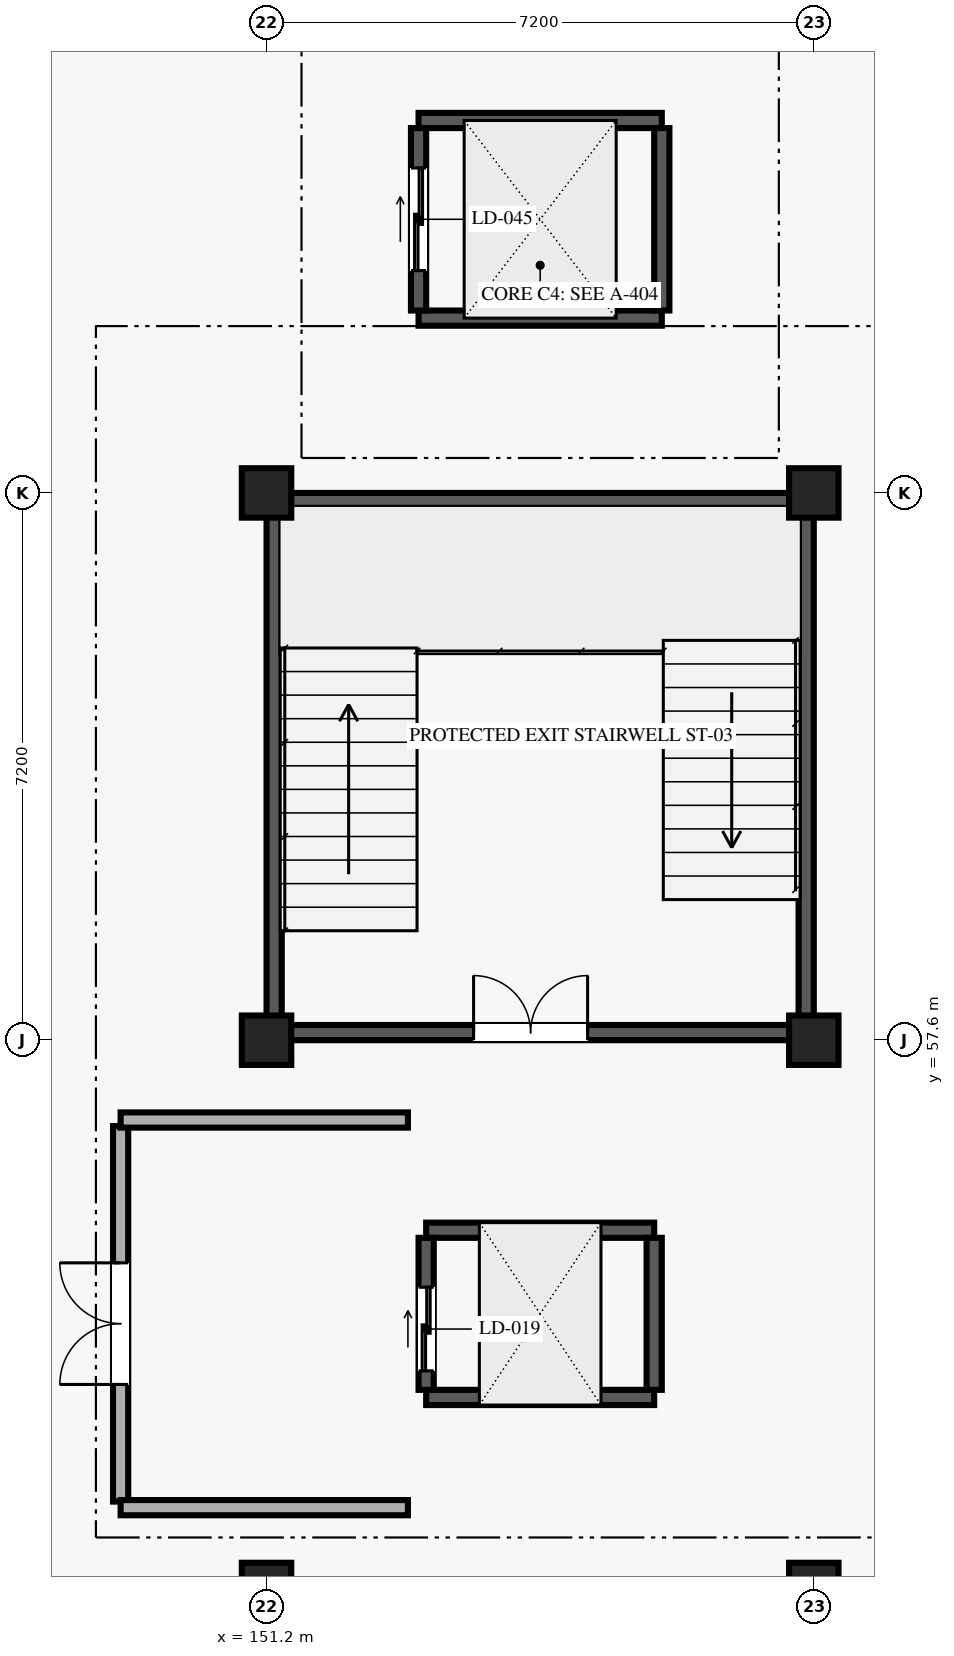
"""IFC4 building model, lengths in metres.
Left out: names, types, materials, properties, quantities, classifications, styles, units other than length and angle.
Written with IfcOpenShell. Run it as: python <this file> out.ifc"""

import sys

from ifc_helpers import new_model, si_unit, direction, frame, frame_2d, origin, origin_2d, place, context, subcontext, project, spatial, rectangle, extrude, element, fill, save


model = new_model("IFC4")
c1 = context("Model", 3, precision=1e-05, world=origin(), true_north=direction((0.0, 1.0)))
c2 = subcontext(c1, "Body", "Model", "MODEL_VIEW")
j1 = project(units=[si_unit("LENGTHUNIT", "METRE"), si_unit("PLANEANGLEUNIT", "RADIAN")], contexts=[c1])
p1 = place(None, origin())
s1 = spatial("IfcSite", under=j1, at=p1, CompositionType="ELEMENT")
p2 = place(p1, origin())
s2 = spatial("IfcBuilding", under=s1, at=p2, CompositionType="ELEMENT")
p3 = place(p2, frame((0.0, 0.0, -4.5)))
s3 = spatial("IfcBuildingStorey", under=s2, at=p3, CompositionType="ELEMENT", Elevation=-4.5)
for number, where, z_axis, x_axis in (
    (1, (151.2, 50.4, 0.0), (0.0, 0.0, 1.0), (1.0, 0.0, 0.0)),
    (2, (151.2, 57.6, 0.0), (0.0, 0.0, 1.0), (1.0, 0.0, 0.0)),
    (3, (151.2, 64.8, 0.0), (0.0, 0.0, 1.0), (1.0, 0.0, 0.0)),
    (4, (158.4, 50.4, 0.0), (0.0, 0.0, 1.0), (1.0, 0.0, 0.0)),
    (5, (158.4, 57.6, 0.0), (0.0, 0.0, 1.0), (1.0, 0.0, 0.0)),
    (6, (158.4, 64.8, 0.0), (0.0, 0.0, 1.0), (1.0, 0.0, 0.0)),
):
    element("IfcColumn", number, at=place(p3, frame(where, z_axis=z_axis, x_axis=x_axis)), inside=s3, PredefinedType="COLUMN", context=c2, shape_type="SweptSolid", body=[
        extrude(rectangle(XDim=0.65, YDim=0.65, at=origin_2d()), origin(), (0.0, 0.0, 1.0), 4.5),
    ])
p4 = place(p3, frame((151.4, 57.7, 0.0), z_axis=(0.0, 0.0, 1.0), x_axis=(1.0, 0.0, 0.0)))
e7 = element("IfcWall", 7, at=p4, inside=s3, PredefinedType="SHEAR", context=c2, shape_type="SweptSolid", body=[
    extrude(rectangle(XDim=6.8, YDim=0.2, at=frame_2d((3.4, 0.0))), origin(), (0.0, 0.0, 1.0), 4.25),
])
p5 = place(p4, frame((2.524, 0.0, 0.0)))
e8 = element("IfcOpeningElement", 8, at=p5, cuts=e7, PredefinedType="OPENING", context=c2, shape_type="SweptSolid", body=[
    extrude(rectangle(XDim=1.5, YDim=2.15, at=frame_2d((0.75, 1.075))), frame((0.0, 0.11, 0.0), z_axis=(0.0, -1.0, 0.0), x_axis=(1.0, 0.0, 0.0)), (0.0, 0.0, 1.0), 0.22),
])
for number, where, z_axis, x_axis in (
    (9, (151.4, 64.7, 0.0), (0.0, 0.0, 1.0), (1.0, 0.0, 0.0)),
    (10, (151.3, 57.8, 0.0), (0.0, 0.0, 1.0), (0.0, 1.0, 0.0)),
    (11, (158.3, 57.8, 0.0), (0.0, 0.0, 1.0), (0.0, 1.0, 0.0)),
):
    element("IfcWall", number, at=place(p3, frame(where, z_axis=z_axis, x_axis=x_axis)), inside=s3, PredefinedType="SHEAR", context=c2, shape_type="SweptSolid", body=[
        extrude(rectangle(XDim=6.8, YDim=0.2, at=frame_2d((3.4, 0.0))), origin(), (0.0, 0.0, 1.0), 4.25),
    ])
for number, where, z_axis, x_axis in (
    (12, (153.3, 52.9, 0.0), (0.0, 0.0, 1.0), (1.0, 0.0, 0.0)),
    (13, (153.3, 55.1, 0.0), (0.0, 0.0, 1.0), (1.0, 0.0, 0.0)),
):
    element("IfcWall", number, at=place(p3, frame(where, z_axis=z_axis, x_axis=x_axis)), inside=s3, PredefinedType="SHEAR", context=c2, shape_type="SweptSolid", body=[
        extrude(rectangle(XDim=3.0, YDim=0.2, at=frame_2d((1.5, 0.0))), origin(), (0.0, 0.0, 1.0), 4.25),
    ])
p6 = place(p3, frame((153.3, 53.0, 0.0), z_axis=(0.0, 0.0, 1.0), x_axis=(0.0, 1.0, 0.0)))
e14 = element("IfcWall", 14, at=p6, inside=s3, PredefinedType="SHEAR", context=c2, shape_type="SweptSolid", body=[
    extrude(rectangle(XDim=2.0, YDim=0.2, at=frame_2d((1.0, 0.0))), origin(), (0.0, 0.0, 1.0), 4.25),
])
p7 = place(p6, frame((0.25, 0.0, 0.0)))
e15 = element("IfcOpeningElement", 15, at=p7, cuts=e14, PredefinedType="OPENING", context=c2, shape_type="SweptSolid", body=[
    extrude(rectangle(XDim=1.1, YDim=2.15, at=frame_2d((0.55, 1.075))), frame((0.0, 0.11, 0.0), z_axis=(0.0, -1.0, 0.0), x_axis=(1.0, 0.0, 0.0)), (0.0, 0.0, 1.0), 0.22),
])
p8 = place(p3, frame((156.3, 53.0, 0.0), z_axis=(0.0, 0.0, 1.0), x_axis=(0.0, 1.0, 0.0)))
e16 = element("IfcWall", 16, at=p8, inside=s3, PredefinedType="SHEAR", context=c2, shape_type="SweptSolid", body=[
    extrude(rectangle(XDim=2.0, YDim=0.2, at=frame_2d((1.0, 0.0))), origin(), (0.0, 0.0, 1.0), 4.25),
])
for number, where, z_axis, x_axis in (
    (17, (153.2, 67.1, 0.0), (0.0, 0.0, 1.0), (1.0, 0.0, 0.0)),
    (18, (153.2, 69.7, 0.0), (0.0, 0.0, 1.0), (1.0, 0.0, 0.0)),
):
    element("IfcWall", number, at=place(p3, frame(where, z_axis=z_axis, x_axis=x_axis)), inside=s3, PredefinedType="SHEAR", context=c2, shape_type="SweptSolid", body=[
        extrude(rectangle(XDim=3.2, YDim=0.2, at=frame_2d((1.6, 0.0))), origin(), (0.0, 0.0, 1.0), 4.25),
    ])
p9 = place(p3, frame((153.2, 67.2, 0.0), z_axis=(0.0, 0.0, 1.0), x_axis=(0.0, 1.0, 0.0)))
e19 = element("IfcWall", 19, at=p9, inside=s3, PredefinedType="SHEAR", context=c2, shape_type="SweptSolid", body=[
    extrude(rectangle(XDim=2.4, YDim=0.2, at=frame_2d((1.2, 0.0))), origin(), (0.0, 0.0, 1.0), 4.25),
])
p10 = place(p9, frame((0.525, 0.0, 0.0)))
e20 = element("IfcOpeningElement", 20, at=p10, cuts=e19, PredefinedType="OPENING", context=c2, shape_type="SweptSolid", body=[
    extrude(rectangle(XDim=1.35, YDim=2.2, at=frame_2d((0.675, 1.1))), frame((0.0, 0.11, 0.0), z_axis=(0.0, -1.0, 0.0), x_axis=(1.0, 0.0, 0.0)), (0.0, 0.0, 1.0), 0.22),
])
p11 = place(p3, frame((156.4, 67.2, 0.0), z_axis=(0.0, 0.0, 1.0), x_axis=(0.0, 1.0, 0.0)))
e21 = element("IfcWall", 21, at=p11, inside=s3, PredefinedType="SHEAR", context=c2, shape_type="SweptSolid", body=[
    extrude(rectangle(XDim=2.4, YDim=0.2, at=frame_2d((1.2, 0.0))), origin(), (0.0, 0.0, 1.0), 4.25),
])
p12 = place(p3, frame((149.28, 51.53, 0.0), z_axis=(0.0, 0.0, 1.0), x_axis=(0.0, 1.0, 0.0)))
e22 = element("IfcWall", 22, at=p12, inside=s3, PredefinedType="SOLIDWALL", context=c2, shape_type="SweptSolid", body=[
    extrude(rectangle(XDim=4.94, YDim=0.2, at=frame_2d((2.47, 0.0))), origin(), (0.0, 0.0, 1.0), 4.25),
])
p13 = place(p12, frame((1.541, 0.0, 0.0)))
e23 = element("IfcOpeningElement", 23, at=p13, cuts=e22, PredefinedType="OPENING", context=c2, shape_type="SweptSolid", body=[
    extrude(rectangle(XDim=1.6, YDim=2.2, at=frame_2d((0.8, 1.1))), frame((0.0, 0.11, 0.0), z_axis=(0.0, -1.0, 0.0), x_axis=(1.0, 0.0, 0.0)), (0.0, 0.0, 1.0), 0.22),
])
for number, where, z_axis, x_axis in (
    (24, (149.28, 51.45, 0.0), (0.0, 0.0, 1.0), (1.0, 0.0, 0.0)),
    (25, (149.28, 56.55, 0.0), (0.0, 0.0, 1.0), (1.0, 0.0, 0.0)),
):
    element("IfcWall", number, at=place(p3, frame(where, z_axis=z_axis, x_axis=x_axis)), inside=s3, PredefinedType="SOLIDWALL", context=c2, shape_type="SweptSolid", body=[
        extrude(rectangle(XDim=3.78, YDim=0.2, at=frame_2d((1.89, 0.0))), origin(), (0.0, 0.0, 1.0), 4.25),
    ])
p14 = place(p5, origin())
e26 = element("IfcDoor", 26, at=p14, inside=s3, OperationType="DOUBLE_DOOR_SINGLE_SWING", PredefinedType="DOOR", context=c2, shape_type="SweptSolid", body=[
    extrude(rectangle(XDim=1.5, YDim=2.15, at=frame_2d((0.75, 1.075))), frame((0.0, 0.025, 0.0), z_axis=(0.0, -1.0, 0.0), x_axis=(1.0, 0.0, 0.0)), (0.0, 0.0, 1.0), 0.05),
])
fill(e8, e26)
p15 = place(p7, origin())
e27 = element("IfcDoor", 27, at=p15, inside=s3, OperationType="DOUBLE_DOOR_SLIDING", PredefinedType="DOOR", context=c2, shape_type="SweptSolid", body=[
    extrude(rectangle(XDim=1.1, YDim=2.15, at=frame_2d((0.55, 1.075))), frame((0.0, 0.025, 0.0), z_axis=(0.0, -1.0, 0.0), x_axis=(1.0, 0.0, 0.0)), (0.0, 0.0, 1.0), 0.05),
])
fill(e15, e27)
p16 = place(p10, origin())
e28 = element("IfcDoor", 28, at=p16, inside=s3, OperationType="DOUBLE_DOOR_SLIDING", PredefinedType="DOOR", context=c2, shape_type="SweptSolid", body=[
    extrude(rectangle(XDim=1.35, YDim=2.2, at=frame_2d((0.675, 1.1))), frame((0.0, 0.025, 0.0), z_axis=(0.0, -1.0, 0.0), x_axis=(1.0, 0.0, 0.0)), (0.0, 0.0, 1.0), 0.05),
])
fill(e20, e28)
p17 = place(p13, origin())
e29 = element("IfcDoor", 29, at=p17, inside=s3, OperationType="DOUBLE_DOOR_SINGLE_SWING", PredefinedType="DOOR", context=c2, shape_type="SweptSolid", body=[
    extrude(rectangle(XDim=1.6, YDim=2.2, at=frame_2d((0.8, 1.1))), frame((0.0, 0.025, 0.0), z_axis=(0.0, -1.0, 0.0), x_axis=(1.0, 0.0, 0.0)), (0.0, 0.0, 1.0), 0.05),
])
fill(e23, e29)
save(model, sys.argv[1])
